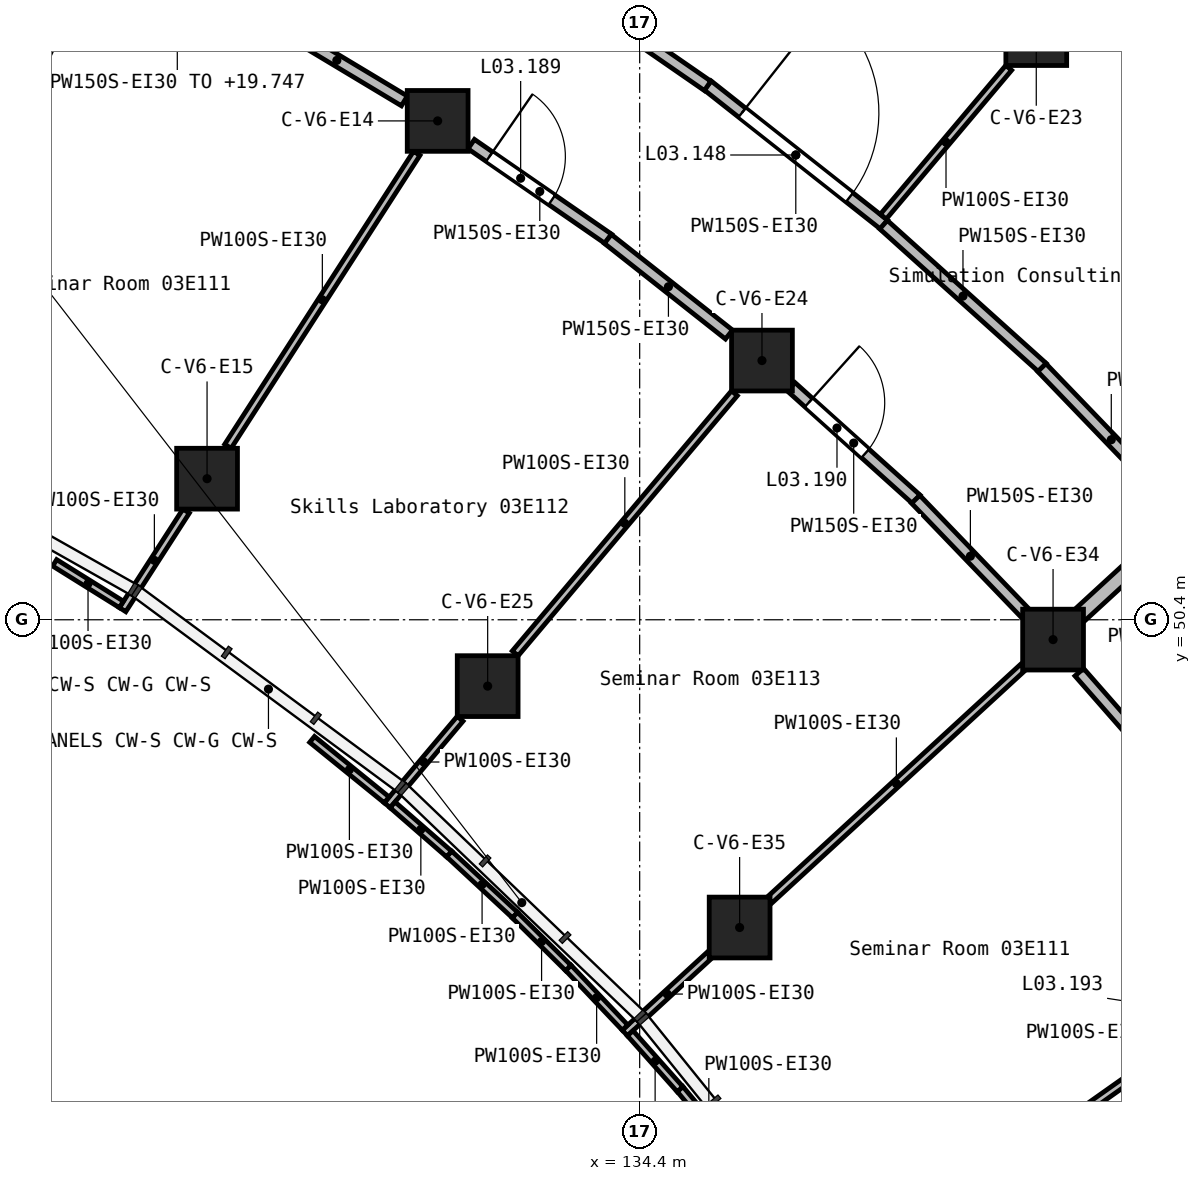
"""IFC4 building model, lengths in metres.
Left out: names, types, materials, properties, quantities, classifications, styles, units other than length and angle.
Written with IfcOpenShell. Run it as: python <this file> out.ifc"""

import sys

from ifc_helpers import new_model, si_unit, direction, frame, frame_2d, origin, origin_2d, place, context, subcontext, project, spatial, rectangle, extrude, element, fill, save


model = new_model("IFC4")
c1 = context("Model", 3, precision=1e-05, world=origin(), true_north=direction((0.0, 1.0)))
c2 = subcontext(c1, "Body", "Model", "MODEL_VIEW")
j1 = project(units=[si_unit("LENGTHUNIT", "METRE"), si_unit("PLANEANGLEUNIT", "RADIAN")], contexts=[c1])
p1 = place(None, origin())
s1 = spatial("IfcSite", under=j1, at=p1, CompositionType="ELEMENT")
p2 = place(p1, origin())
s2 = spatial("IfcBuilding", under=s1, at=p2, CompositionType="ELEMENT")
p3 = place(p2, frame((0.0, 0.0, 16.8)))
s3 = spatial("IfcBuildingStorey", under=s2, at=p3, CompositionType="ELEMENT", Elevation=16.8)
for number, where, z_axis, x_axis in (
    (1, (128.708, 52.256, 0.0), (0.0, 0.0, 1.0), (1.0, 0.0, 0.0)),
    (2, (131.742, 56.963, 0.0), (0.0, 0.0, 1.0), (1.0, 0.0, 0.0)),
    (3, (132.4, 49.527, 0.0), (0.0, 0.0, 1.0), (1.0, 0.0, 0.0)),
    (4, (135.715, 46.351, 0.0), (0.0, 0.0, 1.0), (1.0, 0.0, 0.0)),
    (5, (136.009, 53.81, 0.0), (0.0, 0.0, 1.0), (1.0, 0.0, 0.0)),
    (6, (139.618, 58.092, 0.0), (0.0, 0.0, 1.0), (1.0, 0.0, 0.0)),
    (7, (139.839, 50.139, 0.0), (0.0, 0.0, 1.0), (1.0, 0.0, 0.0)),
):
    element("IfcColumn", number, at=place(p3, frame(where, z_axis=z_axis, x_axis=x_axis)), inside=s3, PredefinedType="COLUMN", context=c2, shape_type="SweptSolid", body=[
        extrude(rectangle(XDim=0.8, YDim=0.8, at=origin_2d()), origin(), (0.0, 0.0, 1.0), 4.2),
    ])
p4 = place(p3, frame((140.196, 50.467, 0.0), z_axis=(0.0, 0.0, 1.0), x_axis=(0.736519787736, 0.676415997943, 0.0)))
e8 = element("IfcWall", 8, at=p4, inside=s3, PredefinedType="SOLIDWALL", context=c2, shape_type="SweptSolid", body=[
    extrude(rectangle(XDim=1.966, YDim=0.2, at=frame_2d((0.983, 0.0))), origin(), (0.0, 0.0, 1.0), 3.9),
])
p5 = place(p3, frame((135.293, 57.43, 0.0), z_axis=(0.0, 0.0, 1.0), x_axis=(0.785039104315, -0.619446208073, 0.0)))
e9 = element("IfcWall", 9, at=p5, inside=s3, PredefinedType="PARTITIONING", context=c2, shape_type="SweptSolid", body=[
    extrude(rectangle(XDim=2.958, YDim=0.15, at=frame_2d((1.479, 0.0))), origin(), (0.0, 0.0, 1.0), 3.9),
])
p6 = place(p5, frame((0.579, 0.0, 0.0)))
e10 = element("IfcOpeningElement", 10, at=p6, cuts=e9, PredefinedType="OPENING", context=c2, shape_type="SweptSolid", body=[
    extrude(rectangle(XDim=1.8, YDim=2.1, at=frame_2d((0.9, 1.05))), frame((0.0, 0.085, 0.0), z_axis=(0.0, -1.0, 0.0), x_axis=(1.0, 0.0, 0.0)), (0.0, 0.0, 1.0), 0.17),
])
p7 = place(p3, frame((137.608, 55.598, 0.0), z_axis=(0.0, 0.0, 1.0), x_axis=(0.743501368773, -0.668734412628, 0.0)))
e11 = element("IfcWall", 11, at=p7, inside=s3, PredefinedType="PARTITIONING", context=c2, shape_type="SweptSolid", body=[
    extrude(rectangle(XDim=2.812, YDim=0.15, at=frame_2d((1.406, 0.0))), origin(), (0.0, 0.0, 1.0), 3.9),
])
p8 = place(p3, frame((133.101, 58.94, 0.0), z_axis=(0.0, 0.0, 1.0), x_axis=(0.822620530797, -0.568590768754, 0.0)))
e12 = element("IfcWall", 12, at=p8, inside=s3, PredefinedType="PARTITIONING", context=c2, shape_type="SweptSolid", body=[
    extrude(rectangle(XDim=2.666, YDim=0.15, at=frame_2d((1.333, 0.0))), origin(), (0.0, 0.0, 1.0), 3.9),
])
p9 = place(p3, frame((139.691, 53.718, 0.0), z_axis=(0.0, 0.0, 1.0), x_axis=(0.693447550136, -0.720507109757, 0.0)))
e13 = element("IfcWall", 13, at=p9, inside=s3, PredefinedType="PARTITIONING", context=c2, shape_type="SweptSolid", body=[
    extrude(rectangle(XDim=2.635, YDim=0.15, at=frame_2d((1.317, 0.0))), origin(), (0.0, 0.0, 1.0), 3.9),
])
p10 = place(p3, frame((136.393, 53.465, 0.0), z_axis=(0.0, 0.0, 1.0), x_axis=(0.743617683722, -0.668605070618, 0.0)))
e14 = element("IfcWall", 14, at=p10, inside=s3, PredefinedType="PARTITIONING", context=c2, shape_type="SweptSolid", body=[
    extrude(rectangle(XDim=2.213, YDim=0.15, at=frame_2d((1.106, 0.0))), origin(), (0.0, 0.0, 1.0), 3.9),
])
p11 = place(p10, frame((0.311, 0.0, 0.0)))
e15 = element("IfcOpeningElement", 15, at=p11, cuts=e14, PredefinedType="OPENING", context=c2, shape_type="SweptSolid", body=[
    extrude(rectangle(XDim=1.0, YDim=2.1, at=frame_2d((0.5, 1.05))), frame((0.0, 0.085, 0.0), z_axis=(0.0, -1.0, 0.0), x_axis=(1.0, 0.0, 0.0)), (0.0, 0.0, 1.0), 0.17),
])
p12 = place(p3, frame((132.184, 56.658, 0.0), z_axis=(0.0, 0.0, 1.0), x_axis=(0.82273696549, -0.568422277551, 0.0)))
e16 = element("IfcWall", 16, at=p12, inside=s3, PredefinedType="PARTITIONING", context=c2, shape_type="SweptSolid", body=[
    extrude(rectangle(XDim=2.193, YDim=0.15, at=frame_2d((1.096, 0.0))), origin(), (0.0, 0.0, 1.0), 3.9),
])
p13 = place(p12, frame((0.29, 0.0, 0.0)))
e17 = element("IfcOpeningElement", 17, at=p13, cuts=e16, PredefinedType="OPENING", context=c2, shape_type="SweptSolid", body=[
    extrude(rectangle(XDim=1.0, YDim=2.1, at=frame_2d((0.5, 1.05))), frame((0.0, 0.085, 0.0), z_axis=(0.0, -1.0, 0.0), x_axis=(1.0, 0.0, 0.0)), (0.0, 0.0, 1.0), 0.17),
])
p14 = place(p3, frame((133.981, 55.41, 0.0), z_axis=(0.0, 0.0, 1.0), x_axis=(0.784968928218, -0.619535133574, 0.0)))
e18 = element("IfcWall", 18, at=p14, inside=s3, PredefinedType="PARTITIONING", context=c2, shape_type="SweptSolid", body=[
    extrude(rectangle(XDim=2.031, YDim=0.15, at=frame_2d((1.015, 0.0))), origin(), (0.0, 0.0, 1.0), 3.9),
])
p15 = place(p3, frame((129.527, 58.293, 0.0), z_axis=(0.0, 0.0, 1.0), x_axis=(0.8573370195, -0.514755509922, 0.0)))
e19 = element("IfcWall", 19, at=p15, inside=s3, PredefinedType="PARTITIONING", context=c2, shape_type="SweptSolid", body=[
    extrude(rectangle(XDim=2.073, YDim=0.15, at=frame_2d((1.037, 0.0))), origin(), (0.0, 0.0, 1.0), 3.9),
])
p16 = place(p3, frame((140.184, 49.71, 0.0), z_axis=(0.0, 0.0, 1.0), x_axis=(0.659209376091, -0.751959439381, 0.0)))
e20 = element("IfcWall", 20, at=p16, inside=s3, PredefinedType="PARTITIONING", context=c2, shape_type="SweptSolid", body=[
    extrude(rectangle(XDim=2.035, YDim=0.15, at=frame_2d((1.017, 0.0))), origin(), (0.0, 0.0, 1.0), 3.9),
])
p17 = place(p3, frame((138.031, 51.985, 0.0), z_axis=(0.0, 0.0, 1.0), x_axis=(0.693216793474, -0.7207291289, 0.0)))
e21 = element("IfcWall", 21, at=p17, inside=s3, PredefinedType="PARTITIONING", context=c2, shape_type="SweptSolid", body=[
    extrude(rectangle(XDim=2.076, YDim=0.15, at=frame_2d((1.038, 0.0))), origin(), (0.0, 0.0, 1.0), 3.9),
])
p18 = place(p3, frame((131.079, 47.96, 0.0), z_axis=(0.0, 0.0, 1.0), x_axis=(0.644403525256, 0.764685619479, 0.0)))
e22 = element("IfcWall", 22, at=p18, inside=s3, PredefinedType="PARTITIONING", context=c2, shape_type="SweptSolid", body=[
    extrude(rectangle(XDim=1.488, YDim=0.1, at=frame_2d((0.744, 0.0))), origin(), (0.0, 0.0, 1.0), 3.9),
])
p19 = place(p3, frame((132.762, 49.958, 0.0), z_axis=(0.0, 0.0, 1.0), x_axis=(0.644429680937, 0.76466357722, 0.0)))
e23 = element("IfcWall", 23, at=p19, inside=s3, PredefinedType="PARTITIONING", context=c2, shape_type="SweptSolid", body=[
    extrude(rectangle(XDim=4.475, YDim=0.1, at=frame_2d((2.238, 0.0))), origin(), (0.0, 0.0, 1.0), 3.9),
])
p20 = place(p3, frame((127.597, 50.533, 0.0), z_axis=(0.0, 0.0, 1.0), x_axis=(0.541741092646, 0.840545411348, 0.0)))
e24 = element("IfcWall", 24, at=p20, inside=s3, PredefinedType="PARTITIONING", context=c2, shape_type="SweptSolid", body=[
    extrude(rectangle(XDim=1.543, YDim=0.1, at=frame_2d((0.771, 0.0))), origin(), (0.0, 0.0, 1.0), 3.9),
])
p21 = place(p3, frame((128.983, 52.683, 0.0), z_axis=(0.0, 0.0, 1.0), x_axis=(0.541806664818, 0.840503145716, 0.0)))
e25 = element("IfcWall", 25, at=p21, inside=s3, PredefinedType="PARTITIONING", context=c2, shape_type="SweptSolid", body=[
    extrude(rectangle(XDim=4.585, YDim=0.1, at=frame_2d((2.293, 0.0))), origin(), (0.0, 0.0, 1.0), 3.9),
])
p22 = place(p3, frame((139.026, 43.081, 0.0), z_axis=(0.0, 0.0, 1.0), x_axis=(0.816637661001, 0.577150700108, 0.0)))
e26 = element("IfcWall", 26, at=p22, inside=s3, PredefinedType="PARTITIONING", context=c2, shape_type="SweptSolid", body=[
    extrude(rectangle(XDim=4.551, YDim=0.1, at=frame_2d((2.275, 0.0))), origin(), (0.0, 0.0, 1.0), 3.9),
])
p23 = place(p3, frame((134.205, 44.964, 0.0), z_axis=(0.0, 0.0, 1.0), x_axis=(0.736497059378, 0.676440745023, 0.0)))
e27 = element("IfcWall", 27, at=p23, inside=s3, PredefinedType="PARTITIONING", context=c2, shape_type="SweptSolid", body=[
    extrude(rectangle(XDim=1.512, YDim=0.1, at=frame_2d((0.756, 0.0))), origin(), (0.0, 0.0, 1.0), 3.9),
])
p24 = place(p3, frame((136.111, 46.715, 0.0), z_axis=(0.0, 0.0, 1.0), x_axis=(0.736475017651, 0.676464742892, 0.0)))
e28 = element("IfcWall", 28, at=p24, inside=s3, PredefinedType="PARTITIONING", context=c2, shape_type="SweptSolid", body=[
    extrude(rectangle(XDim=4.524, YDim=0.1, at=frame_2d((2.262, 0.0))), origin(), (0.0, 0.0, 1.0), 3.9),
])
p25 = place(p3, frame((137.605, 55.704, 0.0), z_axis=(0.0, 0.0, 1.0), x_axis=(0.644432238292, 0.764661421971, 0.0)))
e29 = element("IfcWall", 29, at=p25, inside=s3, PredefinedType="PARTITIONING", context=c2, shape_type="SweptSolid", body=[
    extrude(rectangle(XDim=2.561, YDim=0.1, at=frame_2d((1.28, 0.0))), origin(), (0.0, 0.0, 1.0), 3.9),
])
p26 = place(p3, frame((130.09, 48.826, 0.0), z_axis=(0.0, 0.0, 1.0), x_axis=(0.776627985422, -0.629959500492, 0.0)))
e30 = element("IfcWall", 30, at=p26, inside=s3, PredefinedType="PARTITIONING", context=c2, shape_type="SweptSolid", body=[
    extrude(rectangle(XDim=1.263, YDim=0.1, at=frame_2d((0.632, 0.0))), origin(), (0.0, 0.0, 1.0), 3.9),
])
p27 = place(p3, frame((126.703, 51.149, 0.0), z_axis=(0.0, 0.0, 1.0), x_axis=(0.848687049906, -0.528895350067, 0.0)))
e31 = element("IfcWall", 31, at=p27, inside=s3, PredefinedType="PARTITIONING", context=c2, shape_type="SweptSolid", body=[
    extrude(rectangle(XDim=1.034, YDim=0.1, at=frame_2d((0.517, 0.0))), origin(), (0.0, 0.0, 1.0), 3.9),
])
p28 = place(p3, frame((133.461, 45.821, 0.0), z_axis=(0.0, 0.0, 1.0), x_axis=(0.688400207225, -0.725331065578, 0.0)))
e32 = element("IfcWall", 32, at=p28, inside=s3, PredefinedType="PARTITIONING", context=c2, shape_type="SweptSolid", body=[
    extrude(rectangle(XDim=1.084, YDim=0.1, at=frame_2d((0.542, 0.0))), origin(), (0.0, 0.0, 1.0), 3.9),
])
for number, where, z_axis, x_axis in (
    (33, (134.931, 44.226, 0.0), (0.0, 0.0, 1.0), (0.64, -0.769, 0.0)),
    (34, (131.892, 47.32, 0.0), (0.0, 0.0, 1.0), (0.733, -0.68, 0.0)),
):
    element("IfcWall", number, at=place(p3, frame(where, z_axis=z_axis, x_axis=x_axis)), inside=s3, PredefinedType="PARTITIONING", context=c2, shape_type="SweptSolid", body=[
        extrude(rectangle(XDim=1.185, YDim=0.1, at=frame_2d((0.592, 0.0))), origin(), (0.0, 0.0, 1.0), 3.9),
    ])
p29 = place(p3, frame((132.758, 46.514, 0.0), z_axis=(0.0, 0.0, 1.0), x_axis=(0.710804317615, -0.703389808043, 0.0)))
e35 = element("IfcWall", 35, at=p29, inside=s3, PredefinedType="PARTITIONING", context=c2, shape_type="SweptSolid", body=[
    extrude(rectangle(XDim=0.988, YDim=0.1, at=frame_2d((0.494, 0.0))), origin(), (0.0, 0.0, 1.0), 3.9),
])
p30 = place(p3, frame((131.149, 47.965, 0.0), z_axis=(0.0, 0.0, 1.0), x_axis=(0.75424788942, -0.656589766373, 0.0)))
e36 = element("IfcWall", 36, at=p30, inside=s3, PredefinedType="PARTITIONING", context=c2, shape_type="SweptSolid", body=[
    extrude(rectangle(XDim=0.985, YDim=0.1, at=frame_2d((0.492, 0.0))), origin(), (0.0, 0.0, 1.0), 3.9),
])
p31 = place(p3, frame((134.276, 44.96, 0.0), z_axis=(0.0, 0.0, 1.0), x_axis=(0.66477897218, -0.747040104779, 0.0)))
e37 = element("IfcWall", 37, at=p31, inside=s3, PredefinedType="PARTITIONING", context=c2, shape_type="SweptSolid", body=[
    extrude(rectangle(XDim=0.985, YDim=0.1, at=frame_2d((0.493, 0.0))), origin(), (0.0, 0.0, 1.0), 3.9),
])
p32 = place(p6, frame((1.8, 0.0, 0.0), z_axis=(0.0, 0.0, 1.0), x_axis=(-1.0, 0.0, 0.0)))
e38 = element("IfcDoor", 38, at=p32, inside=s3, OperationType="DOUBLE_DOOR_SINGLE_SWING", PredefinedType="DOOR", context=c2, shape_type="SweptSolid", body=[
    extrude(rectangle(XDim=1.8, YDim=2.1, at=frame_2d((0.9, 1.05))), frame((0.0, 0.025, 0.0), z_axis=(0.0, -1.0, 0.0), x_axis=(1.0, 0.0, 0.0)), (0.0, 0.0, 1.0), 0.05),
])
fill(e10, e38)
p33 = place(p13, frame((1.0, 0.0, 0.0), z_axis=(0.0, 0.0, 1.0), x_axis=(-1.0, 0.0, 0.0)))
e39 = element("IfcDoor", 39, at=p33, inside=s3, OperationType="SINGLE_SWING_RIGHT", PredefinedType="DOOR", context=c2, shape_type="SweptSolid", body=[
    extrude(rectangle(XDim=1.0, YDim=2.1, at=frame_2d((0.5, 1.05))), frame((0.0, 0.025, 0.0), z_axis=(0.0, -1.0, 0.0), x_axis=(1.0, 0.0, 0.0)), (0.0, 0.0, 1.0), 0.05),
])
fill(e17, e39)
p34 = place(p11, frame((1.0, 0.0, 0.0), z_axis=(0.0, 0.0, 1.0), x_axis=(-1.0, 0.0, 0.0)))
e40 = element("IfcDoor", 40, at=p34, inside=s3, OperationType="SINGLE_SWING_RIGHT", PredefinedType="DOOR", context=c2, shape_type="SweptSolid", body=[
    extrude(rectangle(XDim=1.0, YDim=2.1, at=frame_2d((0.5, 1.05))), frame((0.0, 0.025, 0.0), z_axis=(0.0, -1.0, 0.0), x_axis=(1.0, 0.0, 0.0)), (0.0, 0.0, 1.0), 0.05),
])
fill(e15, e40)
save(model, sys.argv[1])
